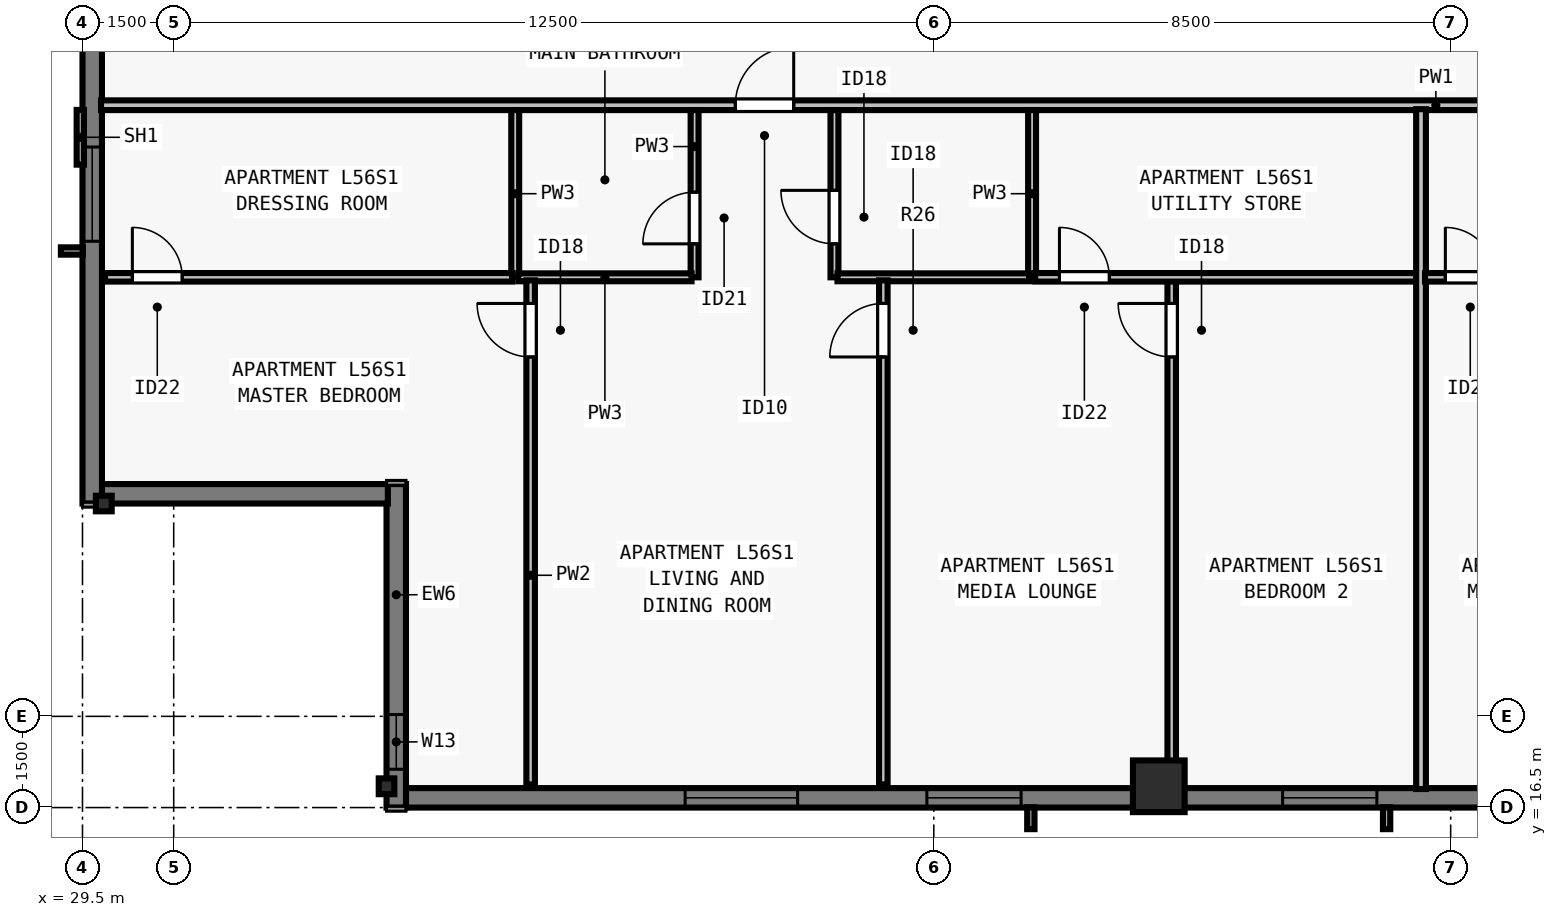
"""IFC4 building model, lengths in metres.
Left out: names, types, materials, properties, quantities, classifications, styles, units other than length and angle.
Written with IfcOpenShell. Run it as: python <this file> out.ifc"""

import sys

from ifc_helpers import new_model, si_unit, direction, frame, frame_2d, origin, origin_2d, place, context, subcontext, project, spatial, rectangle, i_section, extrude, element, fill, save


model = new_model("IFC4")
c1 = context("Model", 3, precision=1e-05, world=origin(), true_north=direction((0.0, 1.0)))
c2 = subcontext(c1, "Body", "Model", "MODEL_VIEW")
j1 = project(units=[si_unit("LENGTHUNIT", "METRE"), si_unit("PLANEANGLEUNIT", "RADIAN")], contexts=[c1])
p1 = place(None, origin())
s1 = spatial("IfcSite", under=j1, at=p1, CompositionType="ELEMENT")
p2 = place(p1, origin())
s2 = spatial("IfcBuilding", under=s1, at=p2, CompositionType="ELEMENT")
p3 = place(p2, frame((0.0, 0.0, 206.0)))
s3 = spatial("IfcBuildingStorey", under=s2, at=p3, CompositionType="ELEMENT", Elevation=206.0)
p4 = place(p3, frame((34.5, 16.85, 0.0), z_axis=(0.0, 0.0, 1.0), x_axis=(1.0, 0.0, 0.0)))
e1 = element("IfcColumn", 1, at=p4, inside=s3, PredefinedType="COLUMN", context=c2, shape_type="SweptSolid", body=[
    extrude(i_section(OverallWidth=0.256, OverallDepth=0.26, WebThickness=0.01, FlangeThickness=0.017, FilletRadius=0.013, at=origin_2d()), origin(), (0.0, 0.0, 1.0), 3.5),
])
p5 = place(p3, frame((47.2, 16.85, 0.0), z_axis=(0.0, 0.0, 1.0), x_axis=(1.0, 0.0, 0.0)))
e2 = element("IfcColumn", 2, at=p5, inside=s3, PredefinedType="COLUMN", context=c2, shape_type="SweptSolid", body=[
    extrude(rectangle(XDim=0.85, YDim=0.85, at=origin_2d()), origin(), (0.0, 0.0, 1.0), 3.5),
])
p6 = place(p3, frame((29.85, 21.5, 0.0), z_axis=(0.0, 0.0, 1.0), x_axis=(0.0, 1.0, 0.0)))
e3 = element("IfcColumn", 3, at=p6, inside=s3, PredefinedType="COLUMN", context=c2, shape_type="SweptSolid", body=[
    extrude(i_section(OverallWidth=0.256, OverallDepth=0.26, WebThickness=0.01, FlangeThickness=0.017, FilletRadius=0.013, at=origin_2d()), origin(), (0.0, 0.0, 1.0), 3.5),
])
p7 = place(p3, frame((69.5, 16.66, 0.0), z_axis=(0.0, 0.0, 1.0), x_axis=(-1.0, 0.0, 0.0)))
e4 = element("IfcWall", 4, at=p7, inside=s3, PredefinedType="SOLIDWALL", context=c2, shape_type="SweptSolid", body=[
    extrude(rectangle(XDim=34.702, YDim=0.32, at=frame_2d((17.351, 0.0))), origin(), (0.0, 0.0, 1.0), 3.29),
])
p8 = place(p7, frame((5.613, 0.0, 0.8)))
e5 = element("IfcOpeningElement", 5, at=p8, cuts=e4, PredefinedType="OPENING", context=c2, shape_type="SweptSolid", body=[
    extrude(rectangle(XDim=1.55, YDim=1.678, at=frame_2d((0.775, 0.839))), frame((0.0, 0.17, 0.0), z_axis=(0.0, -1.0, 0.0), x_axis=(1.0, 0.0, 0.0)), (0.0, 0.0, 1.0), 0.34),
])
p9 = place(p7, frame((7.988, 0.0, 0.8)))
e6 = element("IfcOpeningElement", 6, at=p9, cuts=e4, PredefinedType="OPENING", context=c2, shape_type="SweptSolid", body=[
    extrude(rectangle(XDim=1.85, YDim=1.678, at=frame_2d((0.925, 0.839))), frame((0.0, 0.17, 0.0), z_axis=(0.0, -1.0, 0.0), x_axis=(1.0, 0.0, 0.0)), (0.0, 0.0, 1.0), 0.34),
])
p10 = place(p7, frame((10.263, 0.0, 0.8)))
e7 = element("IfcOpeningElement", 7, at=p10, cuts=e4, PredefinedType="OPENING", context=c2, shape_type="SweptSolid", body=[
    extrude(rectangle(XDim=1.55, YDim=1.678, at=frame_2d((0.775, 0.839))), frame((0.0, 0.17, 0.0), z_axis=(0.0, -1.0, 0.0), x_axis=(1.0, 0.0, 0.0)), (0.0, 0.0, 1.0), 0.34),
])
p11 = place(p7, frame((14.738, 0.0, 0.8)))
e8 = element("IfcOpeningElement", 8, at=p11, cuts=e4, PredefinedType="OPENING", context=c2, shape_type="SweptSolid", body=[
    extrude(rectangle(XDim=1.85, YDim=1.678, at=frame_2d((0.925, 0.839))), frame((0.0, 0.17, 0.0), z_axis=(0.0, -1.0, 0.0), x_axis=(1.0, 0.0, 0.0)), (0.0, 0.0, 1.0), 0.34),
])
p12 = place(p7, frame((18.714, 0.0, 0.8)))
e9 = element("IfcOpeningElement", 9, at=p12, cuts=e4, PredefinedType="OPENING", context=c2, shape_type="SweptSolid", body=[
    extrude(rectangle(XDim=1.55, YDim=1.678, at=frame_2d((0.775, 0.839))), frame((0.0, 0.17, 0.0), z_axis=(0.0, -1.0, 0.0), x_axis=(1.0, 0.0, 0.0)), (0.0, 0.0, 1.0), 0.34),
])
p13 = place(p7, frame((24.564, 0.0, 0.8)))
e10 = element("IfcOpeningElement", 10, at=p13, cuts=e4, PredefinedType="OPENING", context=c2, shape_type="SweptSolid", body=[
    extrude(rectangle(XDim=1.55, YDim=1.678, at=frame_2d((0.775, 0.839))), frame((0.0, 0.17, 0.0), z_axis=(0.0, -1.0, 0.0), x_axis=(1.0, 0.0, 0.0)), (0.0, 0.0, 1.0), 0.34),
])
p14 = place(p7, frame((28.24, 0.0, 0.8)))
e11 = element("IfcOpeningElement", 11, at=p14, cuts=e4, PredefinedType="OPENING", context=c2, shape_type="SweptSolid", body=[
    extrude(rectangle(XDim=1.85, YDim=1.678, at=frame_2d((0.925, 0.839))), frame((0.0, 0.17, 0.0), z_axis=(0.0, -1.0, 0.0), x_axis=(1.0, 0.0, 0.0)), (0.0, 0.0, 1.0), 0.34),
])
p15 = place(p3, frame((34.66, 16.5, 0.0), z_axis=(0.0, 0.0, 1.0), x_axis=(0.0, 1.0, 0.0)))
e12 = element("IfcWall", 12, at=p15, inside=s3, PredefinedType="SOLIDWALL", context=c2, shape_type="SweptSolid", body=[
    extrude(rectangle(XDim=5.32, YDim=0.32, at=frame_2d((2.66, 0.0))), origin(), (0.0, 0.0, 1.0), 3.29),
])
p16 = place(p15, frame((0.63, 0.0, 0.8)))
e13 = element("IfcOpeningElement", 13, at=p16, cuts=e12, PredefinedType="OPENING", context=c2, shape_type="SweptSolid", body=[
    extrude(rectangle(XDim=0.9, YDim=1.678, at=frame_2d((0.45, 0.839))), frame((0.0, 0.17, 0.0), z_axis=(0.0, -1.0, 0.0), x_axis=(1.0, 0.0, 0.0)), (0.0, 0.0, 1.0), 0.34),
])
p17 = place(p3, frame((34.522, 21.66, 0.0), z_axis=(0.0, 0.0, 1.0), x_axis=(-1.0, 0.0, 0.0)))
e14 = element("IfcWall", 14, at=p17, inside=s3, PredefinedType="SOLIDWALL", context=c2, shape_type="SweptSolid", body=[
    extrude(rectangle(XDim=4.724, YDim=0.32, at=frame_2d((2.362, 0.0))), origin(), (0.0, 0.0, 1.0), 3.29),
])
p18 = place(p3, frame((29.66, 21.5, 0.0), z_axis=(0.0, 0.0, 1.0), x_axis=(0.0, 1.0, 0.0)))
e15 = element("IfcWall", 15, at=p18, inside=s3, PredefinedType="SOLIDWALL", context=c2, shape_type="SweptSolid", body=[
    extrude(rectangle(XDim=34.702, YDim=0.32, at=frame_2d((17.351, 0.0))), origin(), (0.0, 0.0, 1.0), 3.29),
])
p19 = place(p18, frame((4.312, 0.0, 0.8)))
e16 = element("IfcOpeningElement", 16, at=p19, cuts=e15, PredefinedType="OPENING", context=c2, shape_type="SweptSolid", body=[
    extrude(rectangle(XDim=1.55, YDim=1.678, at=frame_2d((0.775, 0.839))), frame((0.0, 0.17, 0.0), z_axis=(0.0, -1.0, 0.0), x_axis=(1.0, 0.0, 0.0)), (0.0, 0.0, 1.0), 0.34),
])
p20 = place(p18, frame((9.238, 0.0, 0.8)))
e17 = element("IfcOpeningElement", 17, at=p20, cuts=e15, PredefinedType="OPENING", context=c2, shape_type="SweptSolid", body=[
    extrude(rectangle(XDim=1.85, YDim=1.678, at=frame_2d((0.925, 0.839))), frame((0.0, 0.17, 0.0), z_axis=(0.0, -1.0, 0.0), x_axis=(1.0, 0.0, 0.0)), (0.0, 0.0, 1.0), 0.34),
])
p21 = place(p18, frame((14.738, 0.0, 0.8)))
e18 = element("IfcOpeningElement", 18, at=p21, cuts=e15, PredefinedType="OPENING", context=c2, shape_type="SweptSolid", body=[
    extrude(rectangle(XDim=1.85, YDim=1.678, at=frame_2d((0.925, 0.839))), frame((0.0, 0.17, 0.0), z_axis=(0.0, -1.0, 0.0), x_axis=(1.0, 0.0, 0.0)), (0.0, 0.0, 1.0), 0.34),
])
p22 = place(p18, frame((17.014, 0.0, 0.8)))
e19 = element("IfcOpeningElement", 19, at=p22, cuts=e15, PredefinedType="OPENING", context=c2, shape_type="SweptSolid", body=[
    extrude(rectangle(XDim=1.55, YDim=1.678, at=frame_2d((0.775, 0.839))), frame((0.0, 0.17, 0.0), z_axis=(0.0, -1.0, 0.0), x_axis=(1.0, 0.0, 0.0)), (0.0, 0.0, 1.0), 0.34),
])
p23 = place(p18, frame((24.164, 0.0, 0.8)))
e20 = element("IfcOpeningElement", 20, at=p23, cuts=e15, PredefinedType="OPENING", context=c2, shape_type="SweptSolid", body=[
    extrude(rectangle(XDim=1.55, YDim=1.678, at=frame_2d((0.775, 0.839))), frame((0.0, 0.17, 0.0), z_axis=(0.0, -1.0, 0.0), x_axis=(1.0, 0.0, 0.0)), (0.0, 0.0, 1.0), 0.34),
])
p24 = place(p3, frame((29.805, 28.05, 0.0), z_axis=(0.0, 0.0, 1.0), x_axis=(1.0, 0.0, 0.0)))
e21 = element("IfcWall", 21, at=p24, inside=s3, PredefinedType="PARTITIONING", context=c2, shape_type="SweptSolid", body=[
    extrude(rectangle(XDim=44.39, YDim=0.16, at=frame_2d((22.195, 0.0))), origin(), (0.0, 0.0, 1.0), 2.958),
])
p25 = place(p24, frame((10.431, 0.0, 0.0)))
e22 = element("IfcOpeningElement", 22, at=p25, cuts=e21, PredefinedType="OPENING", context=c2, shape_type="SweptSolid", body=[
    extrude(rectangle(XDim=0.96, YDim=2.18, at=frame_2d((0.48, 1.09))), frame((0.0, 0.09, 0.0), z_axis=(0.0, -1.0, 0.0), x_axis=(1.0, 0.0, 0.0)), (0.0, 0.0, 1.0), 0.18),
])
p26 = place(p24, frame((32.511, 0.0, 0.0)))
e23 = element("IfcOpeningElement", 23, at=p26, cuts=e21, PredefinedType="OPENING", context=c2, shape_type="SweptSolid", body=[
    extrude(rectangle(XDim=0.96, YDim=2.18, at=frame_2d((0.48, 1.09))), frame((0.0, 0.09, 0.0), z_axis=(0.0, -1.0, 0.0), x_axis=(1.0, 0.0, 0.0)), (0.0, 0.0, 1.0), 0.18),
])
p27 = place(p3, frame((36.616, 25.22, 0.0), z_axis=(0.0, 0.0, 1.0), x_axis=(0.0, 1.0, 0.0)))
e24 = element("IfcWall", 24, at=p27, inside=s3, PredefinedType="PLUMBINGWALL", context=c2, shape_type="SweptSolid", body=[
    extrude(rectangle(XDim=2.75, YDim=0.13, at=frame_2d((1.375, 0.0))), origin(), (0.0, 0.0, 1.0), 3.29),
])
p28 = place(p3, frame((39.566, 25.22, 0.0), z_axis=(0.0, 0.0, 1.0), x_axis=(0.0, 1.0, 0.0)))
e25 = element("IfcWall", 25, at=p28, inside=s3, PredefinedType="PLUMBINGWALL", context=c2, shape_type="SweptSolid", body=[
    extrude(rectangle(XDim=2.75, YDim=0.13, at=frame_2d((1.375, 0.0))), origin(), (0.0, 0.0, 1.0), 3.29),
])
p29 = place(p28, frame((0.55, 0.0, 0.0)))
e26 = element("IfcOpeningElement", 26, at=p29, cuts=e25, PredefinedType="OPENING", context=c2, shape_type="SweptSolid", body=[
    extrude(rectangle(XDim=0.85, YDim=2.08, at=frame_2d((0.425, 1.04))), frame((0.0, 0.075, 0.0), z_axis=(0.0, -1.0, 0.0), x_axis=(1.0, 0.0, 0.0)), (0.0, 0.0, 1.0), 0.15),
])
p30 = place(p3, frame((36.666, 25.22, 0.0), z_axis=(0.0, 0.0, 1.0), x_axis=(1.0, 0.0, 0.0)))
e27 = element("IfcWall", 27, at=p30, inside=s3, PredefinedType="PLUMBINGWALL", context=c2, shape_type="SweptSolid", body=[
    extrude(rectangle(XDim=2.85, YDim=0.13, at=frame_2d((1.425, 0.0))), origin(), (0.0, 0.0, 1.0), 3.29),
])
p31 = place(p3, frame((45.116, 25.22, 0.0), z_axis=(0.0, 0.0, 1.0), x_axis=(0.0, 1.0, 0.0)))
e28 = element("IfcWall", 28, at=p31, inside=s3, PredefinedType="PLUMBINGWALL", context=c2, shape_type="SweptSolid", body=[
    extrude(rectangle(XDim=2.75, YDim=0.13, at=frame_2d((1.375, 0.0))), origin(), (0.0, 0.0, 1.0), 3.29),
])
p32 = place(p3, frame((41.866, 25.22, 0.0), z_axis=(0.0, 0.0, 1.0), x_axis=(0.0, 1.0, 0.0)))
e29 = element("IfcWall", 29, at=p32, inside=s3, PredefinedType="PLUMBINGWALL", context=c2, shape_type="SweptSolid", body=[
    extrude(rectangle(XDim=2.75, YDim=0.13, at=frame_2d((1.375, 0.0))), origin(), (0.0, 0.0, 1.0), 2.573),
])
p33 = place(p32, frame((0.55, 0.0, 0.0)))
e30 = element("IfcOpeningElement", 30, at=p33, cuts=e29, PredefinedType="OPENING", context=c2, shape_type="SweptSolid", body=[
    extrude(rectangle(XDim=0.88, YDim=2.1, at=frame_2d((0.44, 1.05))), frame((0.0, 0.075, 0.0), z_axis=(0.0, -1.0, 0.0), x_axis=(1.0, 0.0, 0.0)), (0.0, 0.0, 1.0), 0.15),
])
p34 = place(p3, frame((41.916, 25.22, 0.0), z_axis=(0.0, 0.0, 1.0), x_axis=(1.0, 0.0, 0.0)))
e31 = element("IfcWall", 31, at=p34, inside=s3, PredefinedType="PLUMBINGWALL", context=c2, shape_type="SweptSolid", body=[
    extrude(rectangle(XDim=3.15, YDim=0.13, at=frame_2d((1.575, 0.0))), origin(), (0.0, 0.0, 1.0), 3.29),
])
p35 = place(p3, frame((36.87, 16.88, 0.0), z_axis=(0.0, 0.0, 1.0), x_axis=(0.0, 1.0, 0.0)))
e32 = element("IfcWall", 32, at=p35, inside=s3, PredefinedType="PARTITIONING", context=c2, shape_type="SweptSolid", body=[
    extrude(rectangle(XDim=8.29, YDim=0.14, at=frame_2d((4.145, 0.0))), origin(), (0.0, 0.0, 1.0), 2.573),
])
p36 = place(p35, frame((7.03, 0.0, 0.0)))
e33 = element("IfcOpeningElement", 33, at=p36, cuts=e32, PredefinedType="OPENING", context=c2, shape_type="SweptSolid", body=[
    extrude(rectangle(XDim=0.88, YDim=2.1, at=frame_2d((0.44, 1.05))), frame((0.0, 0.08, 0.0), z_axis=(0.0, -1.0, 0.0), x_axis=(1.0, 0.0, 0.0)), (0.0, 0.0, 1.0), 0.16),
])
p37 = place(p3, frame((29.87, 25.22, 0.0), z_axis=(0.0, 0.0, 1.0), x_axis=(1.0, 0.0, 0.0)))
e34 = element("IfcWall", 34, at=p37, inside=s3, PredefinedType="PARTITIONING", context=c2, shape_type="SweptSolid", body=[
    extrude(rectangle(XDim=6.696, YDim=0.14, at=frame_2d((3.348, 0.0))), origin(), (0.0, 0.0, 1.0), 2.958),
])
p38 = place(p37, frame((0.45, 0.0, 0.0)))
e35 = element("IfcOpeningElement", 35, at=p38, cuts=e34, PredefinedType="OPENING", context=c2, shape_type="SweptSolid", body=[
    extrude(rectangle(XDim=0.82, YDim=2.1, at=frame_2d((0.41, 1.05))), frame((0.0, 0.08, 0.0), z_axis=(0.0, -1.0, 0.0), x_axis=(1.0, 0.0, 0.0)), (0.0, 0.0, 1.0), 0.16),
])
p39 = place(p3, frame((47.413, 16.88, 0.0), z_axis=(0.0, 0.0, 1.0), x_axis=(0.0, 1.0, 0.0)))
e36 = element("IfcWall", 36, at=p39, inside=s3, PredefinedType="PARTITIONING", context=c2, shape_type="SweptSolid", body=[
    extrude(rectangle(XDim=8.38, YDim=0.14, at=frame_2d((4.19, 0.0))), origin(), (0.0, 0.0, 1.0), 2.573),
])
p40 = place(p39, frame((7.03, 0.0, 0.0)))
e37 = element("IfcOpeningElement", 37, at=p40, cuts=e36, PredefinedType="OPENING", context=c2, shape_type="SweptSolid", body=[
    extrude(rectangle(XDim=0.88, YDim=2.1, at=frame_2d((0.44, 1.05))), frame((0.0, 0.08, 0.0), z_axis=(0.0, -1.0, 0.0), x_axis=(1.0, 0.0, 0.0)), (0.0, 0.0, 1.0), 0.16),
])
p41 = place(p3, frame((45.166, 25.22, 0.0), z_axis=(0.0, 0.0, 1.0), x_axis=(1.0, 0.0, 0.0)))
e38 = element("IfcWall", 38, at=p41, inside=s3, PredefinedType="PARTITIONING", context=c2, shape_type="SweptSolid", body=[
    extrude(rectangle(XDim=6.396, YDim=0.14, at=frame_2d((3.198, 0.0))), origin(), (0.0, 0.0, 1.0), 3.29),
])
p42 = place(p41, frame((0.4, 0.0, 0.0)))
e39 = element("IfcOpeningElement", 39, at=p42, cuts=e38, PredefinedType="OPENING", context=c2, shape_type="SweptSolid", body=[
    extrude(rectangle(XDim=0.82, YDim=2.1, at=frame_2d((0.41, 1.05))), frame((0.0, 0.08, 0.0), z_axis=(0.0, -1.0, 0.0), x_axis=(1.0, 0.0, 0.0)), (0.0, 0.0, 1.0), 0.16),
])
p43 = place(p3, frame((42.67, 16.88, 0.0), z_axis=(0.0, 0.0, 1.0), x_axis=(0.0, 1.0, 0.0)))
e40 = element("IfcWall", 40, at=p43, inside=s3, PredefinedType="PARTITIONING", context=c2, shape_type="SweptSolid", body=[
    extrude(rectangle(XDim=8.29, YDim=0.14, at=frame_2d((4.145, 0.0))), origin(), (0.0, 0.0, 1.0), 3.29),
])
p44 = place(p43, frame((7.03, 0.0, 0.0)))
e41 = element("IfcOpeningElement", 41, at=p44, cuts=e40, PredefinedType="OPENING", context=c2, shape_type="SweptSolid", body=[
    extrude(rectangle(XDim=0.88, YDim=2.1, at=frame_2d((0.44, 1.05))), frame((0.0, 0.08, 0.0), z_axis=(0.0, -1.0, 0.0), x_axis=(1.0, 0.0, 0.0)), (0.0, 0.0, 1.0), 0.16),
])
p45 = place(p3, frame((51.512, 16.805, 0.0), z_axis=(0.0, 0.0, 1.0), x_axis=(0.0, 1.0, 0.0)))
e42 = element("IfcWall", 42, at=p45, inside=s3, PredefinedType="PARTITIONING", context=c2, shape_type="SweptSolid", body=[
    extrude(rectangle(XDim=11.18, YDim=0.16, at=frame_2d((5.59, 0.0))), origin(), (0.0, 0.0, 1.0), 2.958),
])
p46 = place(p3, frame((51.577, 25.22, 0.0), z_axis=(0.0, 0.0, 1.0), x_axis=(1.0, 0.0, 0.0)))
e43 = element("IfcWall", 43, at=p46, inside=s3, PredefinedType="PARTITIONING", context=c2, shape_type="SweptSolid", body=[
    extrude(rectangle(XDim=7.069, YDim=0.14, at=frame_2d((3.534, 0.0))), origin(), (0.0, 0.0, 1.0), 3.29),
])
p47 = place(p46, frame((0.335, 0.0, 0.0)))
e44 = element("IfcOpeningElement", 44, at=p47, cuts=e43, PredefinedType="OPENING", context=c2, shape_type="SweptSolid", body=[
    extrude(rectangle(XDim=0.82, YDim=2.1, at=frame_2d((0.41, 1.05))), frame((0.0, 0.08, 0.0), z_axis=(0.0, -1.0, 0.0), x_axis=(1.0, 0.0, 0.0)), (0.0, 0.0, 1.0), 0.16),
])
p48 = place(p12, origin())
e45 = element("IfcWindow", 45, at=p48, inside=s3, PartitioningType="SINGLE_PANEL", PredefinedType="WINDOW", context=c2, shape_type="SweptSolid", body=[
    extrude(rectangle(XDim=1.55, YDim=1.678, at=frame_2d((0.775, 0.839))), frame((0.0, -0.05, 0.0), z_axis=(0.0, -1.0, 0.0), x_axis=(1.0, 0.0, 0.0)), (0.0, 0.0, 1.0), 0.06),
])
fill(e9, e45)
p49 = place(p13, origin())
e46 = element("IfcWindow", 46, at=p49, inside=s3, PartitioningType="SINGLE_PANEL", PredefinedType="WINDOW", context=c2, shape_type="SweptSolid", body=[
    extrude(rectangle(XDim=1.55, YDim=1.678, at=frame_2d((0.775, 0.839))), frame((0.0, -0.05, 0.0), z_axis=(0.0, -1.0, 0.0), x_axis=(1.0, 0.0, 0.0)), (0.0, 0.0, 1.0), 0.06),
])
fill(e10, e46)
p50 = place(p14, origin())
e47 = element("IfcWindow", 47, at=p50, inside=s3, PartitioningType="SINGLE_PANEL", PredefinedType="WINDOW", context=c2, shape_type="SweptSolid", body=[
    extrude(rectangle(XDim=1.85, YDim=1.678, at=frame_2d((0.925, 0.839))), frame((0.0, -0.05, 0.0), z_axis=(0.0, -1.0, 0.0), x_axis=(1.0, 0.0, 0.0)), (0.0, 0.0, 1.0), 0.06),
])
fill(e11, e47)
p51 = place(p19, origin())
e48 = element("IfcWindow", 48, at=p51, inside=s3, PartitioningType="SINGLE_PANEL", PredefinedType="WINDOW", context=c2, shape_type="SweptSolid", body=[
    extrude(rectangle(XDim=1.55, YDim=1.678, at=frame_2d((0.775, 0.839))), frame((0.0, -0.05, 0.0), z_axis=(0.0, -1.0, 0.0), x_axis=(1.0, 0.0, 0.0)), (0.0, 0.0, 1.0), 0.06),
])
fill(e16, e48)
p52 = place(p16, origin())
e49 = element("IfcWindow", 49, at=p52, inside=s3, PartitioningType="SINGLE_PANEL", PredefinedType="WINDOW", context=c2, shape_type="SweptSolid", body=[
    extrude(rectangle(XDim=0.9, YDim=1.678, at=frame_2d((0.45, 0.839))), frame((0.0, -0.04, 0.0), z_axis=(0.0, -1.0, 0.0), x_axis=(1.0, 0.0, 0.0)), (0.0, 0.0, 1.0), 0.06),
])
fill(e13, e49)
p53 = place(p29, origin())
e50 = element("IfcDoor", 50, at=p53, inside=s3, OperationType="SINGLE_SWING_LEFT", PredefinedType="DOOR", context=c2, shape_type="SweptSolid", body=[
    extrude(rectangle(XDim=0.85, YDim=2.08, at=frame_2d((0.425, 1.04))), frame((0.0, 0.025, 0.0), z_axis=(0.0, -1.0, 0.0), x_axis=(1.0, 0.0, 0.0)), (0.0, 0.0, 1.0), 0.05),
])
fill(e26, e50)
p54 = place(p33, origin())
e51 = element("IfcDoor", 51, at=p54, inside=s3, OperationType="SINGLE_SWING_RIGHT", PredefinedType="DOOR", context=c2, shape_type="SweptSolid", body=[
    extrude(rectangle(XDim=0.88, YDim=2.1, at=frame_2d((0.44, 1.05))), frame((0.0, 0.025, 0.0), z_axis=(0.0, -1.0, 0.0), x_axis=(1.0, 0.0, 0.0)), (0.0, 0.0, 1.0), 0.05),
])
fill(e30, e51)
p55 = place(p38, origin())
e52 = element("IfcDoor", 52, at=p55, inside=s3, OperationType="SINGLE_SWING_LEFT", PredefinedType="DOOR", context=c2, shape_type="SweptSolid", body=[
    extrude(rectangle(XDim=0.82, YDim=2.1, at=frame_2d((0.41, 1.05))), frame((0.0, 0.025, 0.0), z_axis=(0.0, -1.0, 0.0), x_axis=(1.0, 0.0, 0.0)), (0.0, 0.0, 1.0), 0.05),
])
fill(e35, e52)
p56 = place(p36, origin())
e53 = element("IfcDoor", 53, at=p56, inside=s3, OperationType="SINGLE_SWING_RIGHT", PredefinedType="DOOR", context=c2, shape_type="SweptSolid", body=[
    extrude(rectangle(XDim=0.88, YDim=2.1, at=frame_2d((0.44, 1.05))), frame((0.0, 0.025, 0.0), z_axis=(0.0, -1.0, 0.0), x_axis=(1.0, 0.0, 0.0)), (0.0, 0.0, 1.0), 0.05),
])
fill(e33, e53)
p57 = place(p42, origin())
e54 = element("IfcDoor", 54, at=p57, inside=s3, OperationType="SINGLE_SWING_LEFT", PredefinedType="DOOR", context=c2, shape_type="SweptSolid", body=[
    extrude(rectangle(XDim=0.82, YDim=2.1, at=frame_2d((0.41, 1.05))), frame((0.0, 0.025, 0.0), z_axis=(0.0, -1.0, 0.0), x_axis=(1.0, 0.0, 0.0)), (0.0, 0.0, 1.0), 0.05),
])
fill(e39, e54)
p58 = place(p40, origin())
e55 = element("IfcDoor", 55, at=p58, inside=s3, OperationType="SINGLE_SWING_RIGHT", PredefinedType="DOOR", context=c2, shape_type="SweptSolid", body=[
    extrude(rectangle(XDim=0.88, YDim=2.1, at=frame_2d((0.44, 1.05))), frame((0.0, 0.025, 0.0), z_axis=(0.0, -1.0, 0.0), x_axis=(1.0, 0.0, 0.0)), (0.0, 0.0, 1.0), 0.05),
])
fill(e37, e55)
p59 = place(p44, origin())
e56 = element("IfcDoor", 56, at=p59, inside=s3, OperationType="SINGLE_SWING_LEFT", PredefinedType="DOOR", context=c2, shape_type="SweptSolid", body=[
    extrude(rectangle(XDim=0.88, YDim=2.1, at=frame_2d((0.44, 1.05))), frame((0.0, 0.025, 0.0), z_axis=(0.0, -1.0, 0.0), x_axis=(1.0, 0.0, 0.0)), (0.0, 0.0, 1.0), 0.05),
])
fill(e41, e56)
p60 = place(p25, origin())
e57 = element("IfcDoor", 57, at=p60, inside=s3, OperationType="SINGLE_SWING_RIGHT", PredefinedType="DOOR", context=c2, shape_type="SweptSolid", body=[
    extrude(rectangle(XDim=0.96, YDim=2.18, at=frame_2d((0.48, 1.09))), frame((0.0, 0.025, 0.0), z_axis=(0.0, -1.0, 0.0), x_axis=(1.0, 0.0, 0.0)), (0.0, 0.0, 1.0), 0.05),
])
fill(e22, e57)
p61 = place(p47, origin())
e58 = element("IfcDoor", 58, at=p61, inside=s3, OperationType="SINGLE_SWING_LEFT", PredefinedType="DOOR", context=c2, shape_type="SweptSolid", body=[
    extrude(rectangle(XDim=0.82, YDim=2.1, at=frame_2d((0.41, 1.05))), frame((0.0, 0.025, 0.0), z_axis=(0.0, -1.0, 0.0), x_axis=(1.0, 0.0, 0.0)), (0.0, 0.0, 1.0), 0.05),
])
fill(e44, e58)
save(model, sys.argv[1])
